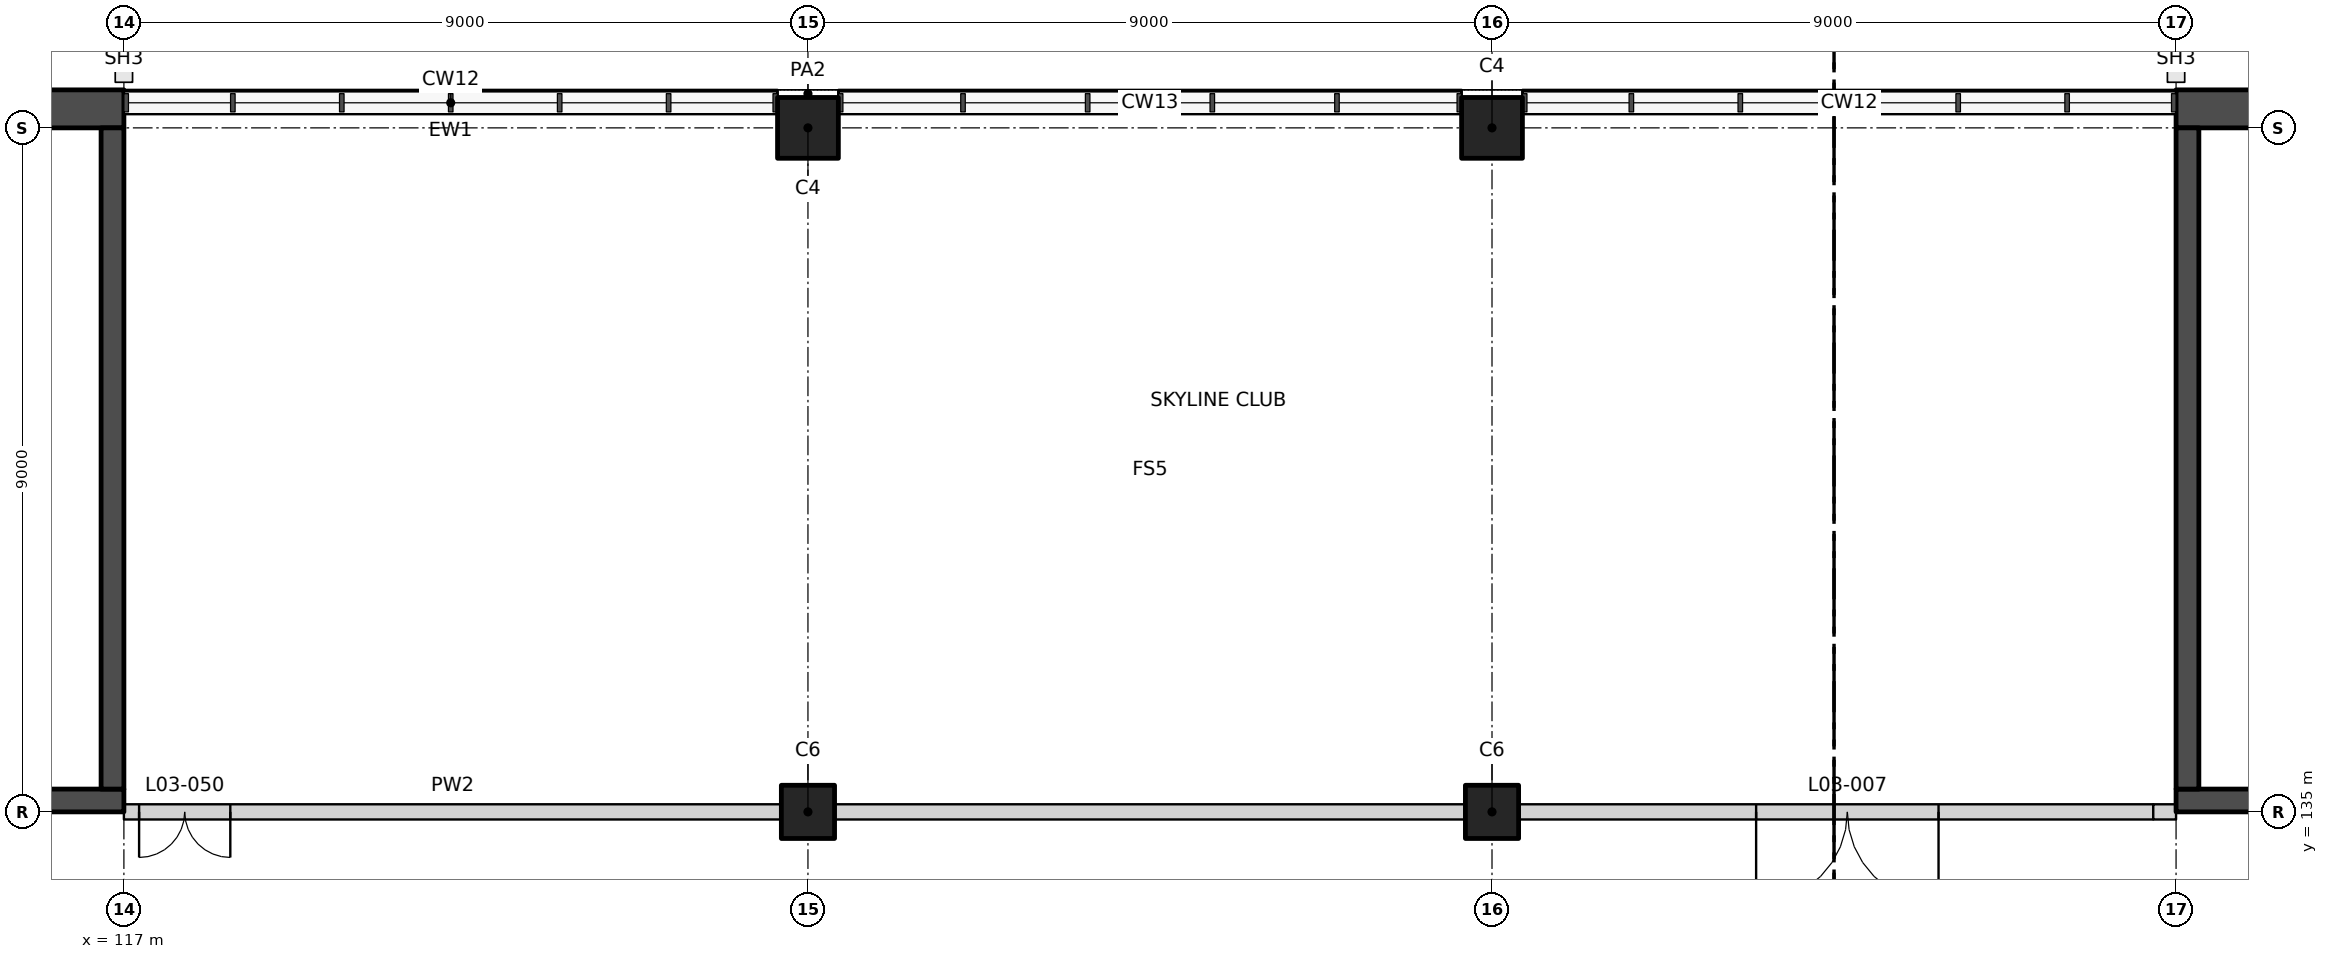
"""IFC4 building model, lengths in metres.
Left out: names, types, materials, properties, quantities, classifications, styles, units other than length and angle.
Written with IfcOpenShell. Run it as: python <this file> out.ifc"""

import sys

from ifc_helpers import new_model, si_unit, direction, frame, frame_2d, origin, origin_2d, place, context, subcontext, project, spatial, rectangle, extrude, element, fill, save


model = new_model("IFC4")
c1 = context("Model", 3, precision=1e-05, world=origin(), true_north=direction((0.0, 1.0)))
c2 = subcontext(c1, "Body", "Model", "MODEL_VIEW")
j1 = project(units=[si_unit("LENGTHUNIT", "METRE"), si_unit("PLANEANGLEUNIT", "RADIAN")], contexts=[c1])
p1 = place(None, origin())
s1 = spatial("IfcSite", under=j1, at=p1, CompositionType="ELEMENT")
p2 = place(p1, origin())
s2 = spatial("IfcBuilding", under=s1, at=p2, CompositionType="ELEMENT")
p3 = place(p2, frame((0.0, 0.0, 22.0)))
s3 = spatial("IfcBuildingStorey", under=s2, at=p3, CompositionType="ELEMENT", Elevation=22.0)
for number, where, z_axis, x_axis in (
    (1, (126.0, 144.0, 0.0), (0.0, 0.0, 1.0), (1.0, 0.0, 0.0)),
    (2, (135.0, 144.0, 0.0), (0.0, 0.0, 1.0), (1.0, 0.0, 0.0)),
):
    element("IfcColumn", number, at=place(p3, frame(where, z_axis=z_axis, x_axis=x_axis)), inside=s3, PredefinedType="COLUMN", context=c2, shape_type="SweptSolid", body=[
        extrude(rectangle(XDim=0.8, YDim=0.8, at=origin_2d()), origin(), (0.0, 0.0, 1.0), 6.0),
    ])
for number, where, z_axis, x_axis in (
    (3, (126.0, 135.0, 0.0), (0.0, 0.0, 1.0), (1.0, 0.0, 0.0)),
    (4, (135.0, 135.0, 0.0), (0.0, 0.0, 1.0), (1.0, 0.0, 0.0)),
):
    element("IfcColumn", number, at=place(p3, frame(where, z_axis=z_axis, x_axis=x_axis)), inside=s3, PredefinedType="COLUMN", context=c2, shape_type="SweptSolid", body=[
        extrude(rectangle(XDim=0.7, YDim=0.7, at=origin_2d()), origin(), (0.0, 0.0, 1.0), 6.0),
    ])
p4 = place(p3, frame((135.35, 135.0, 0.0), z_axis=(0.0, 0.0, 1.0), x_axis=(1.0, 0.0, 0.0)))
e5 = element("IfcWall", 5, at=p4, inside=s3, PredefinedType="PARTITIONING", context=c2, shape_type="SweptSolid", body=[
    extrude(rectangle(XDim=8.35, YDim=0.2, at=frame_2d((4.175, 0.0))), origin(), (0.0, 0.0, 1.0), 4.8),
])
p5 = place(p4, frame((3.125, 0.0, 0.0)))
e6 = element("IfcOpeningElement", 6, at=p5, cuts=e5, PredefinedType="OPENING", context=c2, shape_type="SweptSolid", body=[
    extrude(rectangle(XDim=2.4, YDim=2.4, at=frame_2d((1.2, 1.2))), frame((0.0, 0.11, 0.0), z_axis=(0.0, -1.0, 0.0), x_axis=(1.0, 0.0, 0.0)), (0.0, 0.0, 1.0), 0.22),
])
p6 = place(p3, frame((126.35, 135.0, 0.0), z_axis=(0.0, 0.0, 1.0), x_axis=(1.0, 0.0, 0.0)))
e7 = element("IfcWall", 7, at=p6, inside=s3, PredefinedType="PARTITIONING", context=c2, shape_type="SweptSolid", body=[
    extrude(rectangle(XDim=8.3, YDim=0.2, at=frame_2d((4.15, 0.0))), origin(), (0.0, 0.0, 1.0), 4.8),
])
p7 = place(p3, frame((117.0, 135.0, 0.0), z_axis=(0.0, 0.0, 1.0), x_axis=(1.0, 0.0, 0.0)))
e8 = element("IfcWall", 8, at=p7, inside=s3, PredefinedType="PARTITIONING", context=c2, shape_type="SweptSolid", body=[
    extrude(rectangle(XDim=8.65, YDim=0.2, at=frame_2d((4.325, 0.0))), origin(), (0.0, 0.0, 1.0), 4.8),
])
p8 = place(p7, frame((0.2, 0.0, 0.0)))
e9 = element("IfcOpeningElement", 9, at=p8, cuts=e8, PredefinedType="OPENING", context=c2, shape_type="SweptSolid", body=[
    extrude(rectangle(XDim=1.2, YDim=2.1, at=frame_2d((0.6, 1.05))), frame((0.0, 0.11, 0.0), z_axis=(0.0, -1.0, 0.0), x_axis=(1.0, 0.0, 0.0)), (0.0, 0.0, 1.0), 0.22),
])
p9 = place(p3, frame((125.6, 144.35, 0.0), z_axis=(0.0, 0.0, 1.0), x_axis=(-1.0, 0.0, 0.0)))
e10 = element("IfcWall", 10, at=p9, inside=s3, PredefinedType="SOLIDWALL", context=c2, shape_type="SweptSolid", body=[
    extrude(rectangle(XDim=8.6, YDim=0.3, at=frame_2d((4.3, 0.0))), origin(), (0.0, 0.0, 1.0), 1.0),
])
p10 = place(p3, frame((134.6, 144.35, 0.0), z_axis=(0.0, 0.0, 1.0), x_axis=(-1.0, 0.0, 0.0)))
e11 = element("IfcWall", 11, at=p10, inside=s3, PredefinedType="SOLIDWALL", context=c2, shape_type="SweptSolid", body=[
    extrude(rectangle(XDim=8.2, YDim=0.3, at=frame_2d((4.1, 0.0))), origin(), (0.0, 0.0, 1.0), 1.0),
])
p11 = place(p3, frame((144.0, 144.35, 0.0), z_axis=(0.0, 0.0, 1.0), x_axis=(-1.0, 0.0, 0.0)))
e12 = element("IfcWall", 12, at=p11, inside=s3, PredefinedType="SOLIDWALL", context=c2, shape_type="SweptSolid", body=[
    extrude(rectangle(XDim=8.6, YDim=0.3, at=frame_2d((4.3, 0.0))), origin(), (0.0, 0.0, 1.0), 1.0),
])
p12 = place(p3, frame((117.0, 135.15, 0.0), z_axis=(0.0, 0.0, 1.0), x_axis=(-1.0, 0.0, 0.0)))
e13 = element("IfcWall", 13, at=p12, inside=s3, PredefinedType="SHEAR", context=c2, shape_type="SweptSolid", body=[
    extrude(rectangle(XDim=18.0, YDim=0.3, at=frame_2d((9.0, 0.0))), origin(), (0.0, 0.0, 1.0), 6.0),
])
p13 = place(p12, frame((8.6, 0.0, 0.0)))
e14 = element("IfcOpeningElement", 14, at=p13, cuts=e13, PredefinedType="OPENING", context=c2, shape_type="SweptSolid", body=[
    extrude(rectangle(XDim=1.2, YDim=2.1, at=frame_2d((0.6, 1.05))), frame((0.0, 0.16, 0.0), z_axis=(0.0, -1.0, 0.0), x_axis=(1.0, 0.0, 0.0)), (0.0, 0.0, 1.0), 0.32),
])
p14 = place(p3, frame((117.0, 144.25, 0.0), z_axis=(0.0, 0.0, 1.0), x_axis=(-1.0, 0.0, 0.0)))
e15 = element("IfcWall", 15, at=p14, inside=s3, PredefinedType="SHEAR", context=c2, shape_type="SweptSolid", body=[
    extrude(rectangle(XDim=18.0, YDim=0.5, at=frame_2d((9.0, 0.0))), origin(), (0.0, 0.0, 1.0), 6.0),
])
p15 = place(p3, frame((116.85, 135.3, 0.0), z_axis=(0.0, 0.0, 1.0), x_axis=(0.0, 1.0, 0.0)))
e16 = element("IfcWall", 16, at=p15, inside=s3, PredefinedType="SHEAR", context=c2, shape_type="SweptSolid", body=[
    extrude(rectangle(XDim=8.7, YDim=0.3, at=frame_2d((4.35, 0.0))), origin(), (0.0, 0.0, 1.0), 6.0),
])
p16 = place(p3, frame((144.0, 135.15, 0.0), z_axis=(0.0, 0.0, 1.0), x_axis=(1.0, 0.0, 0.0)))
e17 = element("IfcWall", 17, at=p16, inside=s3, PredefinedType="SHEAR", context=c2, shape_type="SweptSolid", body=[
    extrude(rectangle(XDim=18.0, YDim=0.3, at=frame_2d((9.0, 0.0))), origin(), (0.0, 0.0, 1.0), 6.0),
])
p17 = place(p16, frame((8.6, 0.0, 0.0)))
e18 = element("IfcOpeningElement", 18, at=p17, cuts=e17, PredefinedType="OPENING", context=c2, shape_type="SweptSolid", body=[
    extrude(rectangle(XDim=1.2, YDim=2.1, at=frame_2d((0.6, 1.05))), frame((0.0, 0.16, 0.0), z_axis=(0.0, -1.0, 0.0), x_axis=(1.0, 0.0, 0.0)), (0.0, 0.0, 1.0), 0.32),
])
p18 = place(p3, frame((144.0, 144.25, 0.0), z_axis=(0.0, 0.0, 1.0), x_axis=(1.0, 0.0, 0.0)))
e19 = element("IfcWall", 19, at=p18, inside=s3, PredefinedType="SHEAR", context=c2, shape_type="SweptSolid", body=[
    extrude(rectangle(XDim=18.0, YDim=0.5, at=frame_2d((9.0, 0.0))), origin(), (0.0, 0.0, 1.0), 6.0),
])
p19 = place(p3, frame((144.15, 135.3, 0.0), z_axis=(0.0, 0.0, 1.0), x_axis=(0.0, 1.0, 0.0)))
e20 = element("IfcWall", 20, at=p19, inside=s3, PredefinedType="SHEAR", context=c2, shape_type="SweptSolid", body=[
    extrude(rectangle(XDim=8.7, YDim=0.3, at=frame_2d((4.35, 0.0))), origin(), (0.0, 0.0, 1.0), 6.0),
])
p20 = place(p3, frame((143.7, 135.0, 0.0), z_axis=(0.0, 0.0, 1.0), x_axis=(1.0, 0.0, 0.0)))
e21 = element("IfcWall", 21, at=p20, inside=s3, PredefinedType="PARTITIONING", context=c2, shape_type="SweptSolid", body=[
    extrude(rectangle(XDim=0.3, YDim=0.2, at=frame_2d((0.15, 0.0))), origin(), (0.0, 0.0, 1.0), 6.0),
])
p21 = place(p5, frame((2.4, 0.0, 0.0), z_axis=(0.0, 0.0, 1.0), x_axis=(-1.0, 0.0, 0.0)))
e22 = element("IfcDoor", 22, at=p21, inside=s3, OperationType="DOUBLE_DOOR_DOUBLE_SWING", PredefinedType="DOOR", context=c2, shape_type="SweptSolid", body=[
    extrude(rectangle(XDim=2.4, YDim=2.4, at=frame_2d((1.2, 1.2))), frame((0.0, 0.025, 0.0), z_axis=(0.0, -1.0, 0.0), x_axis=(1.0, 0.0, 0.0)), (0.0, 0.0, 1.0), 0.05),
])
fill(e6, e22)
p22 = place(p8, frame((1.2, 0.0, 0.0), z_axis=(0.0, 0.0, 1.0), x_axis=(-1.0, 0.0, 0.0)))
e23 = element("IfcDoor", 23, at=p22, inside=s3, OperationType="DOUBLE_DOOR_DOUBLE_SWING", PredefinedType="DOOR", context=c2, shape_type="SweptSolid", body=[
    extrude(rectangle(XDim=1.2, YDim=2.1, at=frame_2d((0.6, 1.05))), frame((0.0, 0.025, 0.0), z_axis=(0.0, -1.0, 0.0), x_axis=(1.0, 0.0, 0.0)), (0.0, 0.0, 1.0), 0.05),
])
fill(e9, e23)
save(model, sys.argv[1])
